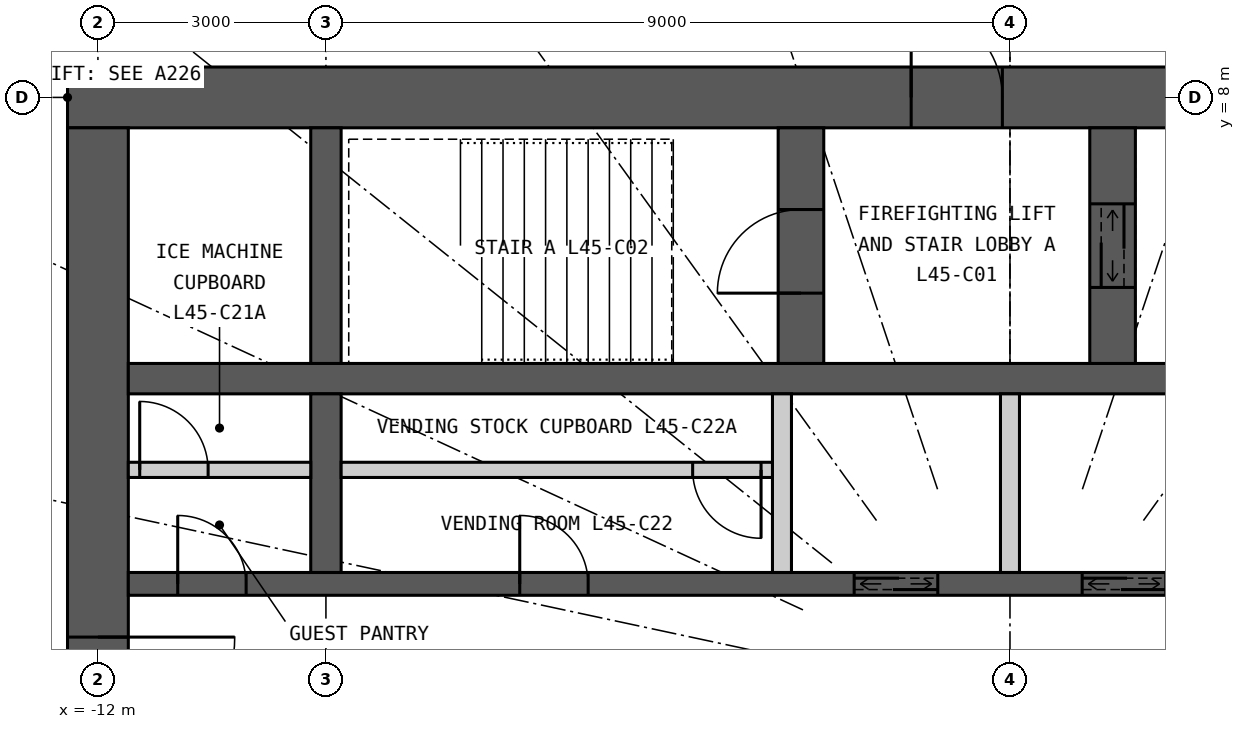
"""IFC4 building model, lengths in metres.
Left out: names, types, materials, properties, quantities, classifications, styles, units other than length and angle.
Written with IfcOpenShell. Run it as: python <this file> out.ifc"""

import sys

from ifc_helpers import new_model, si_unit, direction, frame, frame_2d, origin, place, context, subcontext, project, spatial, rectangle, extrude, element, fill, save


model = new_model("IFC4")
c1 = context("Model", 3, precision=1e-05, world=origin(), true_north=direction((0.0, 1.0)))
c2 = subcontext(c1, "Body", "Model", "MODEL_VIEW")
j1 = project(units=[si_unit("LENGTHUNIT", "METRE"), si_unit("PLANEANGLEUNIT", "RADIAN")], contexts=[c1])
p1 = place(None, origin())
s1 = spatial("IfcSite", under=j1, at=p1, CompositionType="ELEMENT")
p2 = place(p1, origin())
s2 = spatial("IfcBuilding", under=s1, at=p2, CompositionType="ELEMENT")
p3 = place(p2, frame((0.0, 0.0, 169.8)))
s3 = spatial("IfcBuildingStorey", under=s2, at=p3, CompositionType="ELEMENT", Elevation=169.8)
p4 = place(p3, frame((-12.4, 8.0, 0.0), z_axis=(0.0, 0.0, 1.0), x_axis=(1.0, 0.0, 0.0)))
e1 = element("IfcWall", 1, at=p4, inside=s3, PredefinedType="SHEAR", context=c2, shape_type="SweptSolid", body=[
    extrude(rectangle(XDim=24.8, YDim=0.8, at=frame_2d((12.4, 0.0))), origin(), (0.0, 0.0, 1.0), 3.3),
])
p5 = place(p4, frame((11.1, 0.0, 0.0)))
e2 = element("IfcOpeningElement", 2, at=p5, cuts=e1, PredefinedType="OPENING", context=c2, shape_type="SweptSolid", body=[
    extrude(rectangle(XDim=1.2, YDim=2.2, at=frame_2d((0.6, 1.1))), frame((0.0, 0.41, 0.0), z_axis=(0.0, -1.0, 0.0), x_axis=(1.0, 0.0, 0.0)), (0.0, 0.0, 1.0), 0.82),
])
p6 = place(p4, frame((18.7, 0.0, 0.0)))
e3 = element("IfcOpeningElement", 3, at=p6, cuts=e1, PredefinedType="OPENING", context=c2, shape_type="SweptSolid", body=[
    extrude(rectangle(XDim=0.9, YDim=2.2, at=frame_2d((0.45, 1.1))), frame((0.0, 0.41, 0.0), z_axis=(0.0, -1.0, 0.0), x_axis=(1.0, 0.0, 0.0)), (0.0, 0.0, 1.0), 0.82),
])
p7 = place(p3, frame((-12.0, 7.6, 0.0), z_axis=(0.0, 0.0, 1.0), x_axis=(0.0, -1.0, 0.0)))
e4 = element("IfcWall", 4, at=p7, inside=s3, PredefinedType="SHEAR", context=c2, shape_type="SweptSolid", body=[
    extrude(rectangle(XDim=15.2, YDim=0.8, at=frame_2d((7.6, 0.0))), origin(), (0.0, 0.0, 1.0), 3.3),
])
p8 = place(p7, frame((6.7, 0.0, 0.0)))
e5 = element("IfcOpeningElement", 5, at=p8, cuts=e4, PredefinedType="OPENING", context=c2, shape_type="SweptSolid", body=[
    extrude(rectangle(XDim=1.8, YDim=2.2, at=frame_2d((0.9, 1.1))), frame((0.0, 0.41, 0.0), z_axis=(0.0, -1.0, 0.0), x_axis=(1.0, 0.0, 0.0)), (0.0, 0.0, 1.0), 0.82),
])
p9 = place(p3, frame((-11.6, 4.3, 0.0), z_axis=(0.0, 0.0, 1.0), x_axis=(1.0, 0.0, 0.0)))
e6 = element("IfcWall", 6, at=p9, inside=s3, PredefinedType="SHEAR", context=c2, shape_type="SweptSolid", body=[
    extrude(rectangle(XDim=23.2, YDim=0.4, at=frame_2d((11.6, 0.0))), origin(), (0.0, 0.0, 1.0), 3.3),
])
p10 = place(p3, frame((-11.6, 1.6, 0.0), z_axis=(0.0, 0.0, 1.0), x_axis=(1.0, 0.0, 0.0)))
e7 = element("IfcWall", 7, at=p10, inside=s3, PredefinedType="SHEAR", context=c2, shape_type="SweptSolid", body=[
    extrude(rectangle(XDim=23.2, YDim=0.3, at=frame_2d((11.6, 0.0))), origin(), (0.0, 0.0, 1.0), 3.3),
])
p11 = place(p10, frame((9.55, 0.0, 0.0)))
e8 = element("IfcOpeningElement", 8, at=p11, cuts=e7, PredefinedType="OPENING", context=c2, shape_type="SweptSolid", body=[
    extrude(rectangle(XDim=1.1, YDim=2.2, at=frame_2d((0.55, 1.1))), frame((0.0, 0.16, 0.0), z_axis=(0.0, -1.0, 0.0), x_axis=(1.0, 0.0, 0.0)), (0.0, 0.0, 1.0), 0.32),
])
p12 = place(p10, frame((12.55, 0.0, 0.0)))
e9 = element("IfcOpeningElement", 9, at=p12, cuts=e7, PredefinedType="OPENING", context=c2, shape_type="SweptSolid", body=[
    extrude(rectangle(XDim=1.1, YDim=2.2, at=frame_2d((0.55, 1.1))), frame((0.0, 0.16, 0.0), z_axis=(0.0, -1.0, 0.0), x_axis=(1.0, 0.0, 0.0)), (0.0, 0.0, 1.0), 0.32),
])
p13 = place(p10, frame((0.65, 0.0, 0.0)))
e10 = element("IfcOpeningElement", 10, at=p13, cuts=e7, PredefinedType="OPENING", context=c2, shape_type="SweptSolid", body=[
    extrude(rectangle(XDim=0.9, YDim=2.2, at=frame_2d((0.45, 1.1))), frame((0.0, 0.16, 0.0), z_axis=(0.0, -1.0, 0.0), x_axis=(1.0, 0.0, 0.0)), (0.0, 0.0, 1.0), 0.32),
])
p14 = place(p10, frame((5.15, 0.0, 0.0)))
e11 = element("IfcOpeningElement", 11, at=p14, cuts=e7, PredefinedType="OPENING", context=c2, shape_type="SweptSolid", body=[
    extrude(rectangle(XDim=0.9, YDim=2.2, at=frame_2d((0.45, 1.1))), frame((0.0, 0.16, 0.0), z_axis=(0.0, -1.0, 0.0), x_axis=(1.0, 0.0, 0.0)), (0.0, 0.0, 1.0), 0.32),
])
p15 = place(p10, frame((21.65, 0.0, 0.0)))
e12 = element("IfcOpeningElement", 12, at=p15, cuts=e7, PredefinedType="OPENING", context=c2, shape_type="SweptSolid", body=[
    extrude(rectangle(XDim=0.9, YDim=2.2, at=frame_2d((0.45, 1.1))), frame((0.0, 0.16, 0.0), z_axis=(0.0, -1.0, 0.0), x_axis=(1.0, 0.0, 0.0)), (0.0, 0.0, 1.0), 0.32),
])
p16 = place(p3, frame((-9.0, 4.5, 0.0), z_axis=(0.0, 0.0, 1.0), x_axis=(0.0, 1.0, 0.0)))
e13 = element("IfcWall", 13, at=p16, inside=s3, PredefinedType="SHEAR", context=c2, shape_type="SweptSolid", body=[
    extrude(rectangle(XDim=3.1, YDim=0.4, at=frame_2d((1.55, 0.0))), origin(), (0.0, 0.0, 1.0), 3.3),
])
p17 = place(p3, frame((-9.0, 1.75, 0.0), z_axis=(0.0, 0.0, 1.0), x_axis=(0.0, 1.0, 0.0)))
e14 = element("IfcWall", 14, at=p17, inside=s3, PredefinedType="SHEAR", context=c2, shape_type="SweptSolid", body=[
    extrude(rectangle(XDim=2.35, YDim=0.4, at=frame_2d((1.175, 0.0))), origin(), (0.0, 0.0, 1.0), 3.3),
])
p18 = place(p3, frame((-2.75, 4.5, 0.0), z_axis=(0.0, 0.0, 1.0), x_axis=(0.0, 1.0, 0.0)))
e15 = element("IfcWall", 15, at=p18, inside=s3, PredefinedType="SHEAR", context=c2, shape_type="SweptSolid", body=[
    extrude(rectangle(XDim=3.1, YDim=0.6, at=frame_2d((1.55, 0.0))), origin(), (0.0, 0.0, 1.0), 3.3),
])
p19 = place(p18, frame((0.925, 0.0, 0.0)))
e16 = element("IfcOpeningElement", 16, at=p19, cuts=e15, PredefinedType="OPENING", context=c2, shape_type="SweptSolid", body=[
    extrude(rectangle(XDim=1.1, YDim=2.2, at=frame_2d((0.55, 1.1))), frame((0.0, 0.31, 0.0), z_axis=(0.0, -1.0, 0.0), x_axis=(1.0, 0.0, 0.0)), (0.0, 0.0, 1.0), 0.62),
])
p20 = place(p3, frame((1.35, 4.5, 0.0), z_axis=(0.0, 0.0, 1.0), x_axis=(0.0, 1.0, 0.0)))
e17 = element("IfcWall", 17, at=p20, inside=s3, PredefinedType="SHEAR", context=c2, shape_type="SweptSolid", body=[
    extrude(rectangle(XDim=3.1, YDim=0.6, at=frame_2d((1.55, 0.0))), origin(), (0.0, 0.0, 1.0), 3.3),
])
p21 = place(p20, frame((1.0, 0.0, 0.0)))
e18 = element("IfcOpeningElement", 18, at=p21, cuts=e17, PredefinedType="OPENING", context=c2, shape_type="SweptSolid", body=[
    extrude(rectangle(XDim=1.1, YDim=2.2, at=frame_2d((0.55, 1.1))), frame((0.0, 0.31, 0.0), z_axis=(0.0, -1.0, 0.0), x_axis=(1.0, 0.0, 0.0)), (0.0, 0.0, 1.0), 0.62),
])
for number, where, z_axis, x_axis in (
    (19, (-3.0, 1.75, 0.0), (0.0, 0.0, 1.0), (0.0, 1.0, 0.0)),
    (20, (0.0, 1.75, 0.0), (0.0, 0.0, 1.0), (0.0, 1.0, 0.0)),
):
    element("IfcWall", number, at=place(p3, frame(where, z_axis=z_axis, x_axis=x_axis)), inside=s3, PredefinedType="PARTITIONING", context=c2, shape_type="SweptSolid", body=[
        extrude(rectangle(XDim=2.35, YDim=0.25, at=frame_2d((1.175, 0.0))), origin(), (0.0, 0.0, 1.0), 3.3),
    ])
p22 = place(p3, frame((-11.6, 3.1, 0.0), z_axis=(0.0, 0.0, 1.0), x_axis=(1.0, 0.0, 0.0)))
e21 = element("IfcWall", 21, at=p22, inside=s3, PredefinedType="PARTITIONING", context=c2, shape_type="SweptSolid", body=[
    extrude(rectangle(XDim=2.4, YDim=0.2, at=frame_2d((1.2, 0.0))), origin(), (0.0, 0.0, 1.0), 3.12),
])
p23 = place(p22, frame((0.15, 0.0, 0.0)))
e22 = element("IfcOpeningElement", 22, at=p23, cuts=e21, PredefinedType="OPENING", context=c2, shape_type="SweptSolid", body=[
    extrude(rectangle(XDim=0.9, YDim=2.2, at=frame_2d((0.45, 1.1))), frame((0.0, 0.11, 0.0), z_axis=(0.0, -1.0, 0.0), x_axis=(1.0, 0.0, 0.0)), (0.0, 0.0, 1.0), 0.22),
])
p24 = place(p3, frame((-8.8, 3.1, 0.0), z_axis=(0.0, 0.0, 1.0), x_axis=(1.0, 0.0, 0.0)))
e23 = element("IfcWall", 23, at=p24, inside=s3, PredefinedType="PARTITIONING", context=c2, shape_type="SweptSolid", body=[
    extrude(rectangle(XDim=5.675, YDim=0.2, at=frame_2d((2.837, 0.0))), origin(), (0.0, 0.0, 1.0), 3.12),
])
p25 = place(p24, frame((4.625, 0.0, 0.0)))
e24 = element("IfcOpeningElement", 24, at=p25, cuts=e23, PredefinedType="OPENING", context=c2, shape_type="SweptSolid", body=[
    extrude(rectangle(XDim=0.9, YDim=2.2, at=frame_2d((0.45, 1.1))), frame((0.0, 0.11, 0.0), z_axis=(0.0, -1.0, 0.0), x_axis=(1.0, 0.0, 0.0)), (0.0, 0.0, 1.0), 0.22),
])
p26 = place(p5, origin())
e25 = element("IfcDoor", 25, at=p26, inside=s3, OperationType="SINGLE_SWING_LEFT", PredefinedType="DOOR", context=c2, shape_type="SweptSolid", body=[
    extrude(rectangle(XDim=1.2, YDim=2.2, at=frame_2d((0.6, 1.1))), frame((0.0, 0.025, 0.0), z_axis=(0.0, -1.0, 0.0), x_axis=(1.0, 0.0, 0.0)), (0.0, 0.0, 1.0), 0.05),
])
fill(e2, e25)
p27 = place(p19, origin())
e26 = element("IfcDoor", 26, at=p27, inside=s3, OperationType="SINGLE_SWING_LEFT", PredefinedType="DOOR", context=c2, shape_type="SweptSolid", body=[
    extrude(rectangle(XDim=1.1, YDim=2.2, at=frame_2d((0.55, 1.1))), frame((0.0, 0.025, 0.0), z_axis=(0.0, -1.0, 0.0), x_axis=(1.0, 0.0, 0.0)), (0.0, 0.0, 1.0), 0.05),
])
fill(e16, e26)
p28 = place(p21, origin())
e27 = element("IfcDoor", 27, at=p28, inside=s3, OperationType="DOUBLE_DOOR_SLIDING", PredefinedType="DOOR", context=c2, shape_type="SweptSolid", body=[
    extrude(rectangle(XDim=1.1, YDim=2.2, at=frame_2d((0.55, 1.1))), frame((0.0, 0.025, 0.0), z_axis=(0.0, -1.0, 0.0), x_axis=(1.0, 0.0, 0.0)), (0.0, 0.0, 1.0), 0.05),
])
fill(e18, e27)
p29 = place(p11, origin())
e28 = element("IfcDoor", 28, at=p29, inside=s3, OperationType="DOUBLE_DOOR_SLIDING", PredefinedType="DOOR", context=c2, shape_type="SweptSolid", body=[
    extrude(rectangle(XDim=1.1, YDim=2.2, at=frame_2d((0.55, 1.1))), frame((0.0, 0.025, 0.0), z_axis=(0.0, -1.0, 0.0), x_axis=(1.0, 0.0, 0.0)), (0.0, 0.0, 1.0), 0.05),
])
fill(e8, e28)
p30 = place(p12, origin())
e29 = element("IfcDoor", 29, at=p30, inside=s3, OperationType="DOUBLE_DOOR_SLIDING", PredefinedType="DOOR", context=c2, shape_type="SweptSolid", body=[
    extrude(rectangle(XDim=1.1, YDim=2.2, at=frame_2d((0.55, 1.1))), frame((0.0, 0.025, 0.0), z_axis=(0.0, -1.0, 0.0), x_axis=(1.0, 0.0, 0.0)), (0.0, 0.0, 1.0), 0.05),
])
fill(e9, e29)
p31 = place(p23, origin())
e30 = element("IfcDoor", 30, at=p31, inside=s3, OperationType="SINGLE_SWING_LEFT", PredefinedType="DOOR", context=c2, shape_type="SweptSolid", body=[
    extrude(rectangle(XDim=0.9, YDim=2.2, at=frame_2d((0.45, 1.1))), frame((0.0, 0.025, 0.0), z_axis=(0.0, -1.0, 0.0), x_axis=(1.0, 0.0, 0.0)), (0.0, 0.0, 1.0), 0.05),
])
fill(e22, e30)
p32 = place(p13, origin())
e31 = element("IfcDoor", 31, at=p32, inside=s3, OperationType="SINGLE_SWING_LEFT", PredefinedType="DOOR", context=c2, shape_type="SweptSolid", body=[
    extrude(rectangle(XDim=0.9, YDim=2.2, at=frame_2d((0.45, 1.1))), frame((0.0, 0.025, 0.0), z_axis=(0.0, -1.0, 0.0), x_axis=(1.0, 0.0, 0.0)), (0.0, 0.0, 1.0), 0.05),
])
fill(e10, e31)
p33 = place(p25, origin())
e32 = element("IfcDoor", 32, at=p33, inside=s3, OperationType="SINGLE_SWING_RIGHT", PredefinedType="DOOR", context=c2, shape_type="SweptSolid", body=[
    extrude(rectangle(XDim=0.9, YDim=2.2, at=frame_2d((0.45, 1.1))), frame((0.0, 0.025, 0.0), z_axis=(0.0, -1.0, 0.0), x_axis=(1.0, 0.0, 0.0)), (0.0, 0.0, 1.0), 0.05),
])
fill(e24, e32)
p34 = place(p14, origin())
e33 = element("IfcDoor", 33, at=p34, inside=s3, OperationType="SINGLE_SWING_LEFT", PredefinedType="DOOR", context=c2, shape_type="SweptSolid", body=[
    extrude(rectangle(XDim=0.9, YDim=2.2, at=frame_2d((0.45, 1.1))), frame((0.0, 0.025, 0.0), z_axis=(0.0, -1.0, 0.0), x_axis=(1.0, 0.0, 0.0)), (0.0, 0.0, 1.0), 0.05),
])
fill(e11, e33)
p35 = place(p8, origin())
e34 = element("IfcDoor", 34, at=p35, inside=s3, OperationType="DOUBLE_DOOR_DOUBLE_SWING", PredefinedType="DOOR", context=c2, shape_type="SweptSolid", body=[
    extrude(rectangle(XDim=1.8, YDim=2.2, at=frame_2d((0.9, 1.1))), frame((0.0, 0.025, 0.0), z_axis=(0.0, -1.0, 0.0), x_axis=(1.0, 0.0, 0.0)), (0.0, 0.0, 1.0), 0.05),
])
fill(e5, e34)
save(model, sys.argv[1])
